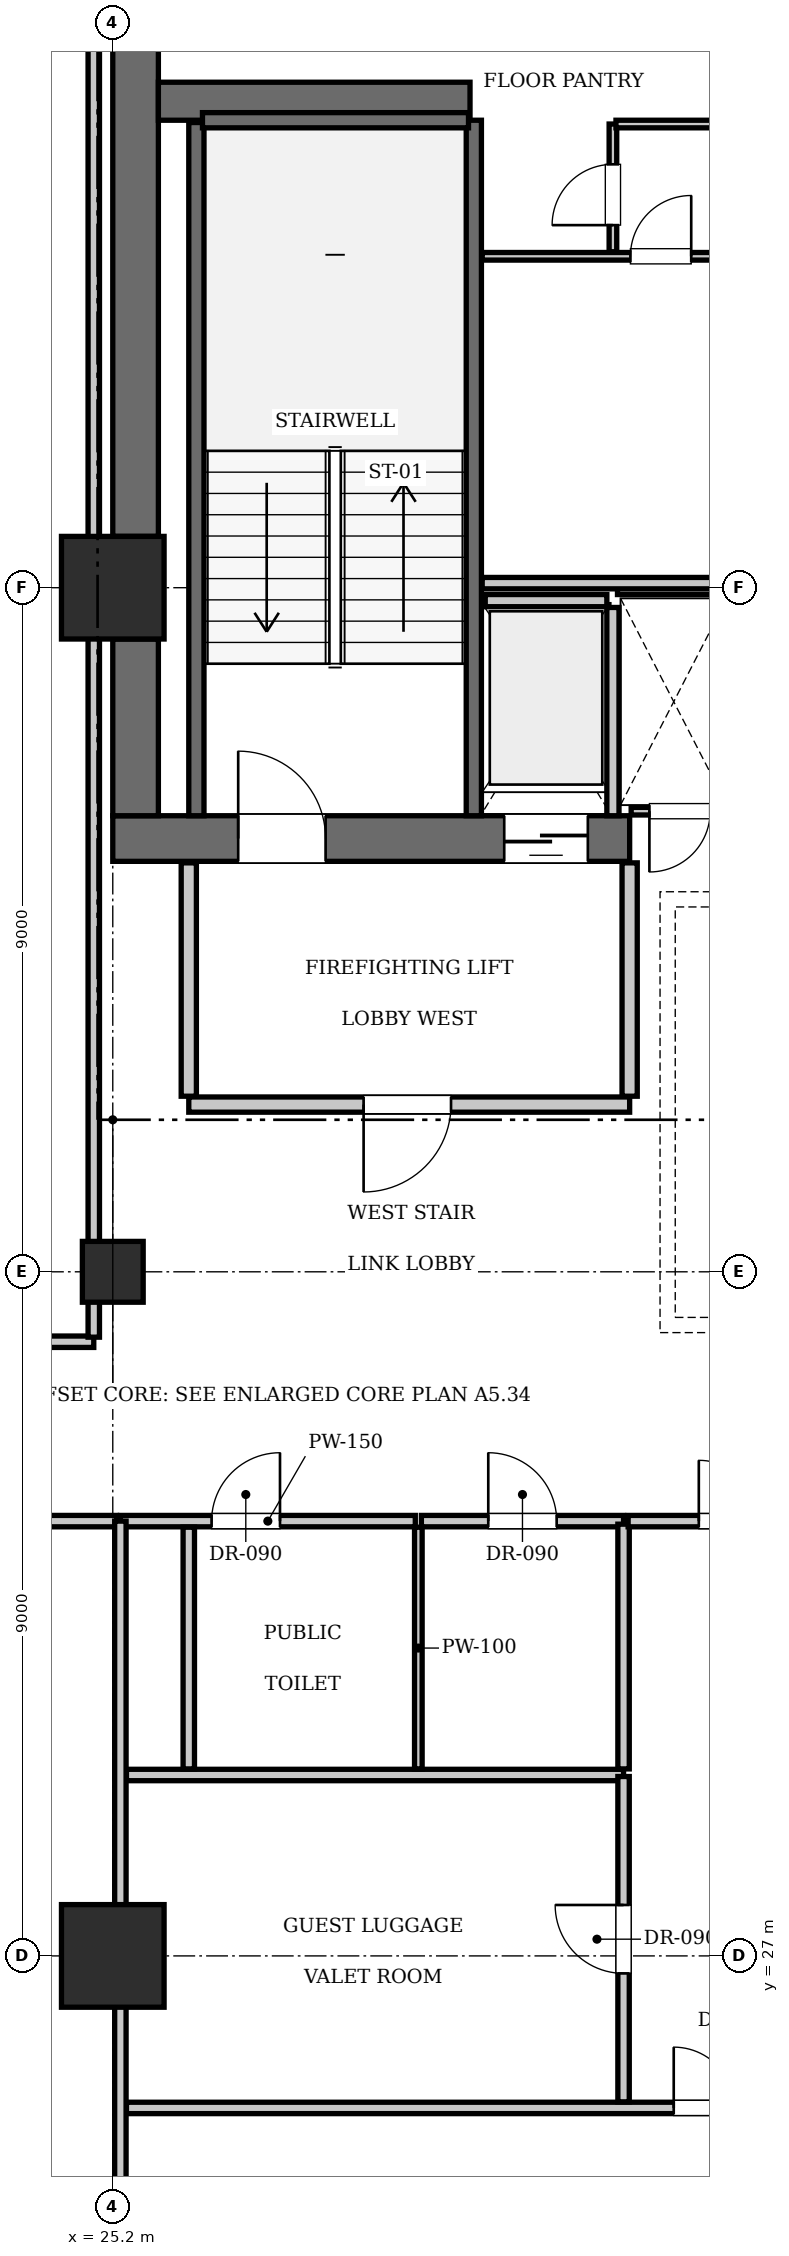
"""IFC4 building model, lengths in metres.
Left out: names, types, materials, properties, quantities, classifications, styles, units other than length and angle.
Written with IfcOpenShell. Run it as: python <this file> out.ifc"""

import sys

from ifc_helpers import new_model, si_unit, direction, frame, frame_2d, origin, origin_2d, place, context, subcontext, project, spatial, rectangle, extrude, element, fill, save


model = new_model("IFC4")
c1 = context("Model", 3, precision=1e-05, world=origin(), true_north=direction((0.0, 1.0)))
c2 = subcontext(c1, "Body", "Model", "MODEL_VIEW")
j1 = project(units=[si_unit("LENGTHUNIT", "METRE"), si_unit("PLANEANGLEUNIT", "RADIAN")], contexts=[c1])
p1 = place(None, origin())
s1 = spatial("IfcSite", under=j1, at=p1, CompositionType="ELEMENT")
p2 = place(p1, origin())
s2 = spatial("IfcBuilding", under=s1, at=p2, CompositionType="ELEMENT")
p3 = place(p2, frame((0.0, 0.0, 322.0)))
s3 = spatial("IfcBuildingStorey", under=s2, at=p3, CompositionType="ELEMENT", Elevation=322.0)
for number, where, z_axis, x_axis in (
    (1, (25.2, 27.0, 0.0), (0.0, 0.0, 1.0), (1.0, 0.0, 0.0)),
    (2, (25.2, 45.0, 0.0), (0.0, 0.0, 1.0), (1.0, 0.0, 0.0)),
):
    element("IfcColumn", number, at=place(p3, frame(where, z_axis=z_axis, x_axis=x_axis)), inside=s3, PredefinedType="COLUMN", context=c2, shape_type="SweptSolid", body=[
        extrude(rectangle(XDim=1.35, YDim=1.35, at=origin_2d()), origin(), (0.0, 0.0, 1.0), 3.85),
    ])
p4 = place(p3, frame((25.2, 41.7, 0.0), z_axis=(0.0, 0.0, 1.0), x_axis=(1.0, 0.0, 0.0)))
e3 = element("IfcWall", 3, at=p4, inside=s3, PredefinedType="SHEAR", context=c2, shape_type="SweptSolid", body=[
    extrude(rectangle(XDim=6.8, YDim=0.6, at=frame_2d((3.4, 0.0))), origin(), (0.0, 0.0, 1.0), 3.85),
])
p5 = place(p4, frame((1.65, 0.0, 0.0)))
e4 = element("IfcOpeningElement", 4, at=p5, cuts=e3, PredefinedType="OPENING", context=c2, shape_type="SweptSolid", body=[
    extrude(rectangle(XDim=1.15, YDim=2.15, at=frame_2d((0.575, 1.075))), frame((0.0, 0.31, 0.0), z_axis=(0.0, -1.0, 0.0), x_axis=(1.0, 0.0, 0.0)), (0.0, 0.0, 1.0), 0.62),
])
p6 = place(p4, frame((5.15, 0.0, 0.0)))
e5 = element("IfcOpeningElement", 5, at=p6, cuts=e3, PredefinedType="OPENING", context=c2, shape_type="SweptSolid", body=[
    extrude(rectangle(XDim=1.1, YDim=2.2, at=frame_2d((0.55, 1.1))), frame((0.0, 0.31, 0.0), z_axis=(0.0, -1.0, 0.0), x_axis=(1.0, 0.0, 0.0)), (0.0, 0.0, 1.0), 0.62),
])
p7 = place(p3, frame((25.5, 42.0, 0.0), z_axis=(0.0, 0.0, 1.0), x_axis=(0.0, 1.0, 0.0)))
e6 = element("IfcWall", 6, at=p7, inside=s3, PredefinedType="SHEAR", context=c2, shape_type="SweptSolid", body=[
    extrude(rectangle(XDim=2.325, YDim=0.6, at=frame_2d((1.163, 0.0))), origin(), (0.0, 0.0, 1.0), 3.85),
])
p8 = place(p3, frame((25.5, 45.675, 0.0), z_axis=(0.0, 0.0, 1.0), x_axis=(0.0, 1.0, 0.0)))
e7 = element("IfcWall", 7, at=p8, inside=s3, PredefinedType="SHEAR", context=c2, shape_type="SweptSolid", body=[
    extrude(rectangle(XDim=7.725, YDim=0.6, at=frame_2d((3.862, 0.0))), origin(), (0.0, 0.0, 1.0), 3.85),
])
p9 = place(p3, frame((25.8, 51.4, 0.0), z_axis=(0.0, 0.0, 1.0), x_axis=(1.0, 0.0, 0.0)))
e8 = element("IfcWall", 8, at=p9, inside=s3, PredefinedType="SHEAR", context=c2, shape_type="SweptSolid", body=[
    extrude(rectangle(XDim=4.1, YDim=0.5, at=frame_2d((2.05, 0.0))), origin(), (0.0, 0.0, 1.0), 3.85),
])
p10 = place(p3, frame((25.2, 36.0, 0.0), z_axis=(0.0, 0.0, 1.0), x_axis=(1.0, 0.0, 0.0)))
e9 = element("IfcColumn", 9, at=p10, inside=s3, PredefinedType="COLUMN", context=c2, shape_type="SweptSolid", body=[
    extrude(rectangle(XDim=0.8, YDim=0.8, at=origin_2d()), origin(), (0.0, 0.0, 1.0), 3.85),
])
p11 = place(p3, frame((29.95, 42.0, 0.0), z_axis=(0.0, 0.0, 1.0), x_axis=(0.0, 1.0, 0.0)))
e10 = element("IfcWall", 10, at=p11, inside=s3, PredefinedType="SOLIDWALL", context=c2, shape_type="SweptSolid", body=[
    extrude(rectangle(XDim=9.15, YDim=0.2, at=frame_2d((4.575, 0.0))), origin(), (0.0, 0.0, 1.0), 3.61),
])
p12 = place(p3, frame((26.3, 42.0, 0.0), z_axis=(0.0, 0.0, 1.0), x_axis=(0.0, 1.0, 0.0)))
e11 = element("IfcWall", 11, at=p12, inside=s3, PredefinedType="SOLIDWALL", context=c2, shape_type="SweptSolid", body=[
    extrude(rectangle(XDim=9.12, YDim=0.2, at=frame_2d((4.56, 0.0))), origin(), (0.0, 0.0, 1.0), 3.61),
])
p13 = place(p3, frame((26.38, 51.15, 0.0), z_axis=(0.0, 0.0, 1.0), x_axis=(1.0, 0.0, 0.0)))
e12 = element("IfcWall", 12, at=p13, inside=s3, PredefinedType="SOLIDWALL", context=c2, shape_type="SweptSolid", body=[
    extrude(rectangle(XDim=3.5, YDim=0.2, at=frame_2d((1.75, 0.0))), origin(), (0.0, 0.0, 1.0), 3.61),
])
p14 = place(p3, frame((30.1, 44.83, 0.0), z_axis=(0.0, 0.0, 1.0), x_axis=(1.0, 0.0, 0.0)))
e13 = element("IfcWall", 13, at=p14, inside=s3, PredefinedType="SOLIDWALL", context=c2, shape_type="SweptSolid", body=[
    extrude(rectangle(XDim=1.6, YDim=0.16, at=frame_2d((0.8, 0.0))), origin(), (0.0, 0.0, 1.0), 3.61),
])
p15 = place(p3, frame((31.78, 42.0, 0.0), z_axis=(0.0, 0.0, 1.0), x_axis=(0.0, 1.0, 0.0)))
e14 = element("IfcWall", 14, at=p15, inside=s3, PredefinedType="SOLIDWALL", context=c2, shape_type="SweptSolid", body=[
    extrude(rectangle(XDim=2.74, YDim=0.16, at=frame_2d((1.37, 0.0))), origin(), (0.0, 0.0, 1.0), 3.61),
])
p16 = place(p3, frame((26.2, 38.2, 0.0), z_axis=(0.0, 0.0, 1.0), x_axis=(1.0, 0.0, 0.0)))
e15 = element("IfcWall", 15, at=p16, inside=s3, PredefinedType="PARTITIONING", context=c2, shape_type="SweptSolid", body=[
    extrude(rectangle(XDim=5.8, YDim=0.2, at=frame_2d((2.9, 0.0))), origin(), (0.0, 0.0, 1.0), 3.61),
])
p17 = place(p16, frame((2.3, 0.0, 0.0)))
e16 = element("IfcOpeningElement", 16, at=p17, cuts=e15, PredefinedType="OPENING", context=c2, shape_type="SweptSolid", body=[
    extrude(rectangle(XDim=1.15, YDim=2.15, at=frame_2d((0.575, 1.075))), frame((0.0, 0.11, 0.0), z_axis=(0.0, -1.0, 0.0), x_axis=(1.0, 0.0, 0.0)), (0.0, 0.0, 1.0), 0.22),
])
for number, where, z_axis, x_axis in (
    (17, (26.2, 38.31, 0.0), (0.0, 0.0, 1.0), (0.0, 1.0, 0.0)),
    (18, (32.0, 38.31, 0.0), (0.0, 0.0, 1.0), (0.0, 1.0, 0.0)),
):
    element("IfcWall", number, at=place(p3, frame(where, z_axis=z_axis, x_axis=x_axis)), inside=s3, PredefinedType="PARTITIONING", context=c2, shape_type="SweptSolid", body=[
        extrude(rectangle(XDim=3.07, YDim=0.2, at=frame_2d((1.535, 0.0))), origin(), (0.0, 0.0, 1.0), 3.61),
    ])
p18 = place(p3, frame((32.02, 42.06, 0.0), z_axis=(0.0, 0.0, 1.0), x_axis=(1.0, 0.0, 0.0)))
e19 = element("IfcWall", 19, at=p18, inside=s3, PredefinedType="PARTITIONING", context=c2, shape_type="SweptSolid", body=[
    extrude(rectangle(XDim=1.32, YDim=0.1, at=frame_2d((0.66, 0.0))), origin(), (0.0, 0.0, 1.0), 3.61),
])
p19 = place(p18, frame((0.24, 0.0, 0.0)))
e20 = element("IfcOpeningElement", 20, at=p19, cuts=e19, PredefinedType="OPENING", context=c2, shape_type="SweptSolid", body=[
    extrude(rectangle(XDim=0.8, YDim=2.05, at=frame_2d((0.4, 1.025))), frame((0.0, 0.06, 0.0), z_axis=(0.0, -1.0, 0.0), x_axis=(1.0, 0.0, 0.0)), (0.0, 0.0, 1.0), 0.12),
])
p20 = place(p3, frame((31.84, 44.96, 0.0), z_axis=(0.0, 0.0, 1.0), x_axis=(1.0, 0.0, 0.0)))
e21 = element("IfcWall", 21, at=p20, inside=s3, PredefinedType="PARTITIONING", context=c2, shape_type="SweptSolid", body=[
    extrude(rectangle(XDim=1.48, YDim=0.1, at=frame_2d((0.74, 0.0))), origin(), (0.0, 0.0, 1.0), 3.61),
])
p21 = place(p3, frame((30.06, 45.06, 0.0), z_axis=(0.0, 0.0, 1.0), x_axis=(1.0, 0.0, 0.0)))
e22 = element("IfcWall", 22, at=p21, inside=s3, PredefinedType="PARTITIONING", context=c2, shape_type="SweptSolid", body=[
    extrude(rectangle(XDim=3.18, YDim=0.15, at=frame_2d((1.59, 0.0))), origin(), (0.0, 0.0, 1.0), 3.61),
])
p22 = place(p3, frame((30.06, 49.36, 0.0), z_axis=(0.0, 0.0, 1.0), x_axis=(1.0, 0.0, 0.0)))
e23 = element("IfcWall", 23, at=p22, inside=s3, PredefinedType="PARTITIONING", context=c2, shape_type="SweptSolid", body=[
    extrude(rectangle(XDim=3.18, YDim=0.1, at=frame_2d((1.59, 0.0))), origin(), (0.0, 0.0, 1.0), 3.61),
])
p23 = place(p22, frame((1.95, 0.0, 0.0)))
e24 = element("IfcOpeningElement", 24, at=p23, cuts=e23, PredefinedType="OPENING", context=c2, shape_type="SweptSolid", body=[
    extrude(rectangle(XDim=0.8, YDim=2.05, at=frame_2d((0.4, 1.025))), frame((0.0, 0.06, 0.0), z_axis=(0.0, -1.0, 0.0), x_axis=(1.0, 0.0, 0.0)), (0.0, 0.0, 1.0), 0.12),
])
p24 = place(p3, frame((31.78, 49.42, 0.0), z_axis=(0.0, 0.0, 1.0), x_axis=(0.0, 1.0, 0.0)))
e25 = element("IfcWall", 25, at=p24, inside=s3, PredefinedType="PARTITIONING", context=c2, shape_type="SweptSolid", body=[
    extrude(rectangle(XDim=1.68, YDim=0.1, at=frame_2d((0.84, 0.0))), origin(), (0.0, 0.0, 1.0), 3.61),
])
p25 = place(p24, frame((0.35, 0.0, 0.0)))
e26 = element("IfcOpeningElement", 26, at=p25, cuts=e25, PredefinedType="OPENING", context=c2, shape_type="SweptSolid", body=[
    extrude(rectangle(XDim=0.8, YDim=2.05, at=frame_2d((0.4, 1.025))), frame((0.0, 0.06, 0.0), z_axis=(0.0, -1.0, 0.0), x_axis=(1.0, 0.0, 0.0)), (0.0, 0.0, 1.0), 0.12),
])
p26 = place(p3, frame((31.82, 51.1, 0.0), z_axis=(0.0, 0.0, 1.0), x_axis=(1.0, 0.0, 0.0)))
e27 = element("IfcWall", 27, at=p26, inside=s3, PredefinedType="PARTITIONING", context=c2, shape_type="SweptSolid", body=[
    extrude(rectangle(XDim=1.42, YDim=0.1, at=frame_2d((0.71, 0.0))), origin(), (0.0, 0.0, 1.0), 3.61),
])
p27 = place(p3, frame((25.3, 32.72, 0.0), z_axis=(0.0, 0.0, 1.0), x_axis=(1.0, 0.0, 0.0)))
e28 = element("IfcWall", 28, at=p27, inside=s3, PredefinedType="PARTITIONING", context=c2, shape_type="SweptSolid", body=[
    extrude(rectangle(XDim=3.88, YDim=0.15, at=frame_2d((1.94, 0.0))), origin(), (0.0, 0.0, 1.0), 3.61),
])
p28 = place(p27, frame((1.2, 0.0, 0.0)))
e29 = element("IfcOpeningElement", 29, at=p28, cuts=e28, PredefinedType="OPENING", context=c2, shape_type="SweptSolid", body=[
    extrude(rectangle(XDim=0.9, YDim=2.1, at=frame_2d((0.45, 1.05))), frame((0.0, 0.085, 0.0), z_axis=(0.0, -1.0, 0.0), x_axis=(1.0, 0.0, 0.0)), (0.0, 0.0, 1.0), 0.17),
])
p29 = place(p3, frame((29.26, 32.72, 0.0), z_axis=(0.0, 0.0, 1.0), x_axis=(1.0, 0.0, 0.0)))
e30 = element("IfcWall", 30, at=p29, inside=s3, PredefinedType="PARTITIONING", context=c2, shape_type="SweptSolid", body=[
    extrude(rectangle(XDim=2.66, YDim=0.15, at=frame_2d((1.33, 0.0))), origin(), (0.0, 0.0, 1.0), 3.61),
])
p30 = place(p29, frame((0.88, 0.0, 0.0)))
e31 = element("IfcOpeningElement", 31, at=p30, cuts=e30, PredefinedType="OPENING", context=c2, shape_type="SweptSolid", body=[
    extrude(rectangle(XDim=0.9, YDim=2.1, at=frame_2d((0.45, 1.05))), frame((0.0, 0.085, 0.0), z_axis=(0.0, -1.0, 0.0), x_axis=(1.0, 0.0, 0.0)), (0.0, 0.0, 1.0), 0.17),
])
p31 = place(p3, frame((25.38, 29.38, 0.0), z_axis=(0.0, 0.0, 1.0), x_axis=(1.0, 0.0, 0.0)))
e32 = element("IfcWall", 32, at=p31, inside=s3, PredefinedType="PARTITIONING", context=c2, shape_type="SweptSolid", body=[
    extrude(rectangle(XDim=6.54, YDim=0.15, at=frame_2d((3.27, 0.0))), origin(), (0.0, 0.0, 1.0), 3.61),
])
p32 = place(p3, frame((26.2, 29.46, 0.0), z_axis=(0.0, 0.0, 1.0), x_axis=(0.0, 1.0, 0.0)))
e33 = element("IfcWall", 33, at=p32, inside=s3, PredefinedType="PARTITIONING", context=c2, shape_type="SweptSolid", body=[
    extrude(rectangle(XDim=3.18, YDim=0.15, at=frame_2d((1.59, 0.0))), origin(), (0.0, 0.0, 1.0), 3.61),
])
p33 = place(p3, frame((29.22, 29.46, 0.0), z_axis=(0.0, 0.0, 1.0), x_axis=(0.0, 1.0, 0.0)))
e34 = element("IfcWall", 34, at=p33, inside=s3, PredefinedType="PARTITIONING", context=c2, shape_type="SweptSolid", body=[
    extrude(rectangle(XDim=3.18, YDim=0.1, at=frame_2d((1.59, 0.0))), origin(), (0.0, 0.0, 1.0), 3.61),
])
p34 = place(p3, frame((31.92, 29.46, 0.0), z_axis=(0.0, 0.0, 1.0), x_axis=(0.0, 1.0, 0.0)))
e35 = element("IfcWall", 35, at=p34, inside=s3, PredefinedType="PARTITIONING", context=c2, shape_type="SweptSolid", body=[
    extrude(rectangle(XDim=3.22, YDim=0.15, at=frame_2d((1.61, 0.0))), origin(), (0.0, 0.0, 1.0), 3.61),
])
p35 = place(p3, frame((25.38, 25.0, 0.0), z_axis=(0.0, 0.0, 1.0), x_axis=(1.0, 0.0, 0.0)))
e36 = element("IfcWall", 36, at=p35, inside=s3, PredefinedType="PARTITIONING", context=c2, shape_type="SweptSolid", body=[
    extrude(rectangle(XDim=10.06, YDim=0.15, at=frame_2d((5.03, 0.0))), origin(), (0.0, 0.0, 1.0), 3.61),
])
p36 = place(p35, frame((7.2, 0.0, 0.0)))
e37 = element("IfcOpeningElement", 37, at=p36, cuts=e36, PredefinedType="OPENING", context=c2, shape_type="SweptSolid", body=[
    extrude(rectangle(XDim=1.6, YDim=2.3, at=frame_2d((0.8, 1.15))), frame((0.0, 0.085, 0.0), z_axis=(0.0, -1.0, 0.0), x_axis=(1.0, 0.0, 0.0)), (0.0, 0.0, 1.0), 0.17),
])
p37 = place(p3, frame((31.92, 25.08, 0.0), z_axis=(0.0, 0.0, 1.0), x_axis=(0.0, 1.0, 0.0)))
e38 = element("IfcWall", 38, at=p37, inside=s3, PredefinedType="PARTITIONING", context=c2, shape_type="SweptSolid", body=[
    extrude(rectangle(XDim=4.28, YDim=0.15, at=frame_2d((2.14, 0.0))), origin(), (0.0, 0.0, 1.0), 3.61),
])
p38 = place(p37, frame((1.69, 0.0, 0.0)))
e39 = element("IfcOpeningElement", 39, at=p38, cuts=e38, PredefinedType="OPENING", context=c2, shape_type="SweptSolid", body=[
    extrude(rectangle(XDim=0.9, YDim=2.1, at=frame_2d((0.45, 1.05))), frame((0.0, 0.085, 0.0), z_axis=(0.0, -1.0, 0.0), x_axis=(1.0, 0.0, 0.0)), (0.0, 0.0, 1.0), 0.17),
])
p39 = place(p3, frame((31.98, 32.72, 0.0), z_axis=(0.0, 0.0, 1.0), x_axis=(1.0, 0.0, 0.0)))
e40 = element("IfcWall", 40, at=p39, inside=s3, PredefinedType="PARTITIONING", context=c2, shape_type="SweptSolid", body=[
    extrude(rectangle(XDim=3.46, YDim=0.15, at=frame_2d((1.73, 0.0))), origin(), (0.0, 0.0, 1.0), 3.61),
])
p40 = place(p39, frame((0.93, 0.0, 0.0)))
e41 = element("IfcOpeningElement", 41, at=p40, cuts=e40, PredefinedType="OPENING", context=c2, shape_type="SweptSolid", body=[
    extrude(rectangle(XDim=1.6, YDim=2.3, at=frame_2d((0.8, 1.15))), frame((0.0, 0.085, 0.0), z_axis=(0.0, -1.0, 0.0), x_axis=(1.0, 0.0, 0.0)), (0.0, 0.0, 1.0), 0.17),
])
p41 = place(p3, frame((17.78, 32.72, 0.0), z_axis=(0.0, 0.0, 1.0), x_axis=(1.0, 0.0, 0.0)))
e42 = element("IfcWall", 42, at=p41, inside=s3, PredefinedType="PARTITIONING", context=c2, shape_type="SweptSolid", body=[
    extrude(rectangle(XDim=7.47, YDim=0.15, at=frame_2d((3.735, 0.0))), origin(), (0.0, 0.0, 1.0), 3.61),
])
p42 = place(p41, frame((3.035, 0.0, 0.0)))
e43 = element("IfcOpeningElement", 43, at=p42, cuts=e42, PredefinedType="OPENING", context=c2, shape_type="SweptSolid", body=[
    extrude(rectangle(XDim=1.4, YDim=2.2, at=frame_2d((0.7, 1.1))), frame((0.0, 0.085, 0.0), z_axis=(0.0, -1.0, 0.0), x_axis=(1.0, 0.0, 0.0)), (0.0, 0.0, 1.0), 0.17),
])
p43 = place(p3, frame((25.3, 13.88, 0.0), z_axis=(0.0, 0.0, 1.0), x_axis=(0.0, 1.0, 0.0)))
e44 = element("IfcWall", 44, at=p43, inside=s3, PredefinedType="PARTITIONING", context=c2, shape_type="SweptSolid", body=[
    extrude(rectangle(XDim=18.84, YDim=0.15, at=frame_2d((9.42, 0.0))), origin(), (0.0, 0.0, 1.0), 3.141),
])
p44 = place(p3, frame((17.78, 35.08, 0.0), z_axis=(0.0, 0.0, 1.0), x_axis=(1.0, 0.0, 0.0)))
e45 = element("IfcWall", 45, at=p44, inside=s3, PredefinedType="PARTITIONING", context=c2, shape_type="SweptSolid", body=[
    extrude(rectangle(XDim=7.17, YDim=0.15, at=frame_2d((3.585, 0.0))), origin(), (0.0, 0.0, 1.0), 3.61),
])
p45 = place(p44, frame((3.135, 0.0, 0.0)))
e46 = element("IfcOpeningElement", 46, at=p45, cuts=e45, PredefinedType="OPENING", context=c2, shape_type="SweptSolid", body=[
    extrude(rectangle(XDim=0.9, YDim=2.1, at=frame_2d((0.45, 1.05))), frame((0.0, 0.085, 0.0), z_axis=(0.0, -1.0, 0.0), x_axis=(1.0, 0.0, 0.0)), (0.0, 0.0, 1.0), 0.17),
])
p46 = place(p3, frame((24.95, 35.14, 0.0), z_axis=(0.0, 0.0, 1.0), x_axis=(0.0, 1.0, 0.0)))
e47 = element("IfcWall", 47, at=p46, inside=s3, PredefinedType="PARTITIONING", context=c2, shape_type="SweptSolid", body=[
    extrude(rectangle(XDim=18.78, YDim=0.15, at=frame_2d((9.39, 0.0))), origin(), (0.0, 0.0, 1.0), 3.61),
])
p47 = place(p5, origin())
e48 = element("IfcDoor", 48, at=p47, inside=s3, OperationType="SINGLE_SWING_LEFT", PredefinedType="DOOR", context=c2, shape_type="SweptSolid", body=[
    extrude(rectangle(XDim=1.15, YDim=2.15, at=frame_2d((0.575, 1.075))), frame((0.0, 0.025, 0.0), z_axis=(0.0, -1.0, 0.0), x_axis=(1.0, 0.0, 0.0)), (0.0, 0.0, 1.0), 0.05),
])
fill(e4, e48)
p48 = place(p6, frame((1.1, 0.0, 0.0), z_axis=(0.0, 0.0, 1.0), x_axis=(-1.0, 0.0, 0.0)))
e49 = element("IfcDoor", 49, at=p48, inside=s3, OperationType="SLIDING_TO_LEFT", PredefinedType="DOOR", context=c2, shape_type="SweptSolid", body=[
    extrude(rectangle(XDim=1.1, YDim=2.2, at=frame_2d((0.55, 1.1))), frame((0.0, 0.025, 0.0), z_axis=(0.0, -1.0, 0.0), x_axis=(1.0, 0.0, 0.0)), (0.0, 0.0, 1.0), 0.05),
])
fill(e5, e49)
p49 = place(p17, frame((1.15, 0.0, 0.0), z_axis=(0.0, 0.0, 1.0), x_axis=(-1.0, 0.0, 0.0)))
e50 = element("IfcDoor", 50, at=p49, inside=s3, OperationType="SINGLE_SWING_RIGHT", PredefinedType="DOOR", context=c2, shape_type="SweptSolid", body=[
    extrude(rectangle(XDim=1.15, YDim=2.15, at=frame_2d((0.575, 1.075))), frame((0.0, 0.025, 0.0), z_axis=(0.0, -1.0, 0.0), x_axis=(1.0, 0.0, 0.0)), (0.0, 0.0, 1.0), 0.05),
])
fill(e16, e50)
p50 = place(p19, frame((0.8, 0.0, 0.0), z_axis=(0.0, 0.0, 1.0), x_axis=(-1.0, 0.0, 0.0)))
e51 = element("IfcDoor", 51, at=p50, inside=s3, OperationType="SINGLE_SWING_RIGHT", PredefinedType="DOOR", context=c2, shape_type="SweptSolid", body=[
    extrude(rectangle(XDim=0.8, YDim=2.05, at=frame_2d((0.4, 1.025))), frame((0.0, 0.025, 0.0), z_axis=(0.0, -1.0, 0.0), x_axis=(1.0, 0.0, 0.0)), (0.0, 0.0, 1.0), 0.05),
])
fill(e20, e51)
p51 = place(p23, origin())
e52 = element("IfcDoor", 52, at=p51, inside=s3, OperationType="SINGLE_SWING_RIGHT", PredefinedType="DOOR", context=c2, shape_type="SweptSolid", body=[
    extrude(rectangle(XDim=0.8, YDim=2.05, at=frame_2d((0.4, 1.025))), frame((0.0, 0.025, 0.0), z_axis=(0.0, -1.0, 0.0), x_axis=(1.0, 0.0, 0.0)), (0.0, 0.0, 1.0), 0.05),
])
fill(e24, e52)
p52 = place(p25, origin())
e53 = element("IfcDoor", 53, at=p52, inside=s3, OperationType="SINGLE_SWING_LEFT", PredefinedType="DOOR", context=c2, shape_type="SweptSolid", body=[
    extrude(rectangle(XDim=0.8, YDim=2.05, at=frame_2d((0.4, 1.025))), frame((0.0, 0.025, 0.0), z_axis=(0.0, -1.0, 0.0), x_axis=(1.0, 0.0, 0.0)), (0.0, 0.0, 1.0), 0.05),
])
fill(e26, e53)
p53 = place(p28, origin())
e54 = element("IfcDoor", 54, at=p53, inside=s3, OperationType="SINGLE_SWING_RIGHT", PredefinedType="DOOR", context=c2, shape_type="SweptSolid", body=[
    extrude(rectangle(XDim=0.9, YDim=2.1, at=frame_2d((0.45, 1.05))), frame((0.0, 0.025, 0.0), z_axis=(0.0, -1.0, 0.0), x_axis=(1.0, 0.0, 0.0)), (0.0, 0.0, 1.0), 0.05),
])
fill(e29, e54)
p54 = place(p30, origin())
e55 = element("IfcDoor", 55, at=p54, inside=s3, OperationType="SINGLE_SWING_LEFT", PredefinedType="DOOR", context=c2, shape_type="SweptSolid", body=[
    extrude(rectangle(XDim=0.9, YDim=2.1, at=frame_2d((0.45, 1.05))), frame((0.0, 0.025, 0.0), z_axis=(0.0, -1.0, 0.0), x_axis=(1.0, 0.0, 0.0)), (0.0, 0.0, 1.0), 0.05),
])
fill(e31, e55)
p55 = place(p36, origin())
e56 = element("IfcDoor", 56, at=p55, inside=s3, OperationType="DOUBLE_DOOR_SINGLE_SWING", PredefinedType="DOOR", context=c2, shape_type="SweptSolid", body=[
    extrude(rectangle(XDim=1.6, YDim=2.3, at=frame_2d((0.8, 1.15))), frame((0.0, 0.025, 0.0), z_axis=(0.0, -1.0, 0.0), x_axis=(1.0, 0.0, 0.0)), (0.0, 0.0, 1.0), 0.05),
])
fill(e37, e56)
p56 = place(p40, origin())
e57 = element("IfcDoor", 57, at=p56, inside=s3, OperationType="DOUBLE_DOOR_SINGLE_SWING", PredefinedType="DOOR", context=c2, shape_type="SweptSolid", body=[
    extrude(rectangle(XDim=1.6, YDim=2.3, at=frame_2d((0.8, 1.15))), frame((0.0, 0.025, 0.0), z_axis=(0.0, -1.0, 0.0), x_axis=(1.0, 0.0, 0.0)), (0.0, 0.0, 1.0), 0.05),
])
fill(e41, e57)
p57 = place(p38, origin())
e58 = element("IfcDoor", 58, at=p57, inside=s3, OperationType="SINGLE_SWING_RIGHT", PredefinedType="DOOR", context=c2, shape_type="SweptSolid", body=[
    extrude(rectangle(XDim=0.9, YDim=2.1, at=frame_2d((0.45, 1.05))), frame((0.0, 0.025, 0.0), z_axis=(0.0, -1.0, 0.0), x_axis=(1.0, 0.0, 0.0)), (0.0, 0.0, 1.0), 0.05),
])
fill(e39, e58)
save(model, sys.argv[1])
